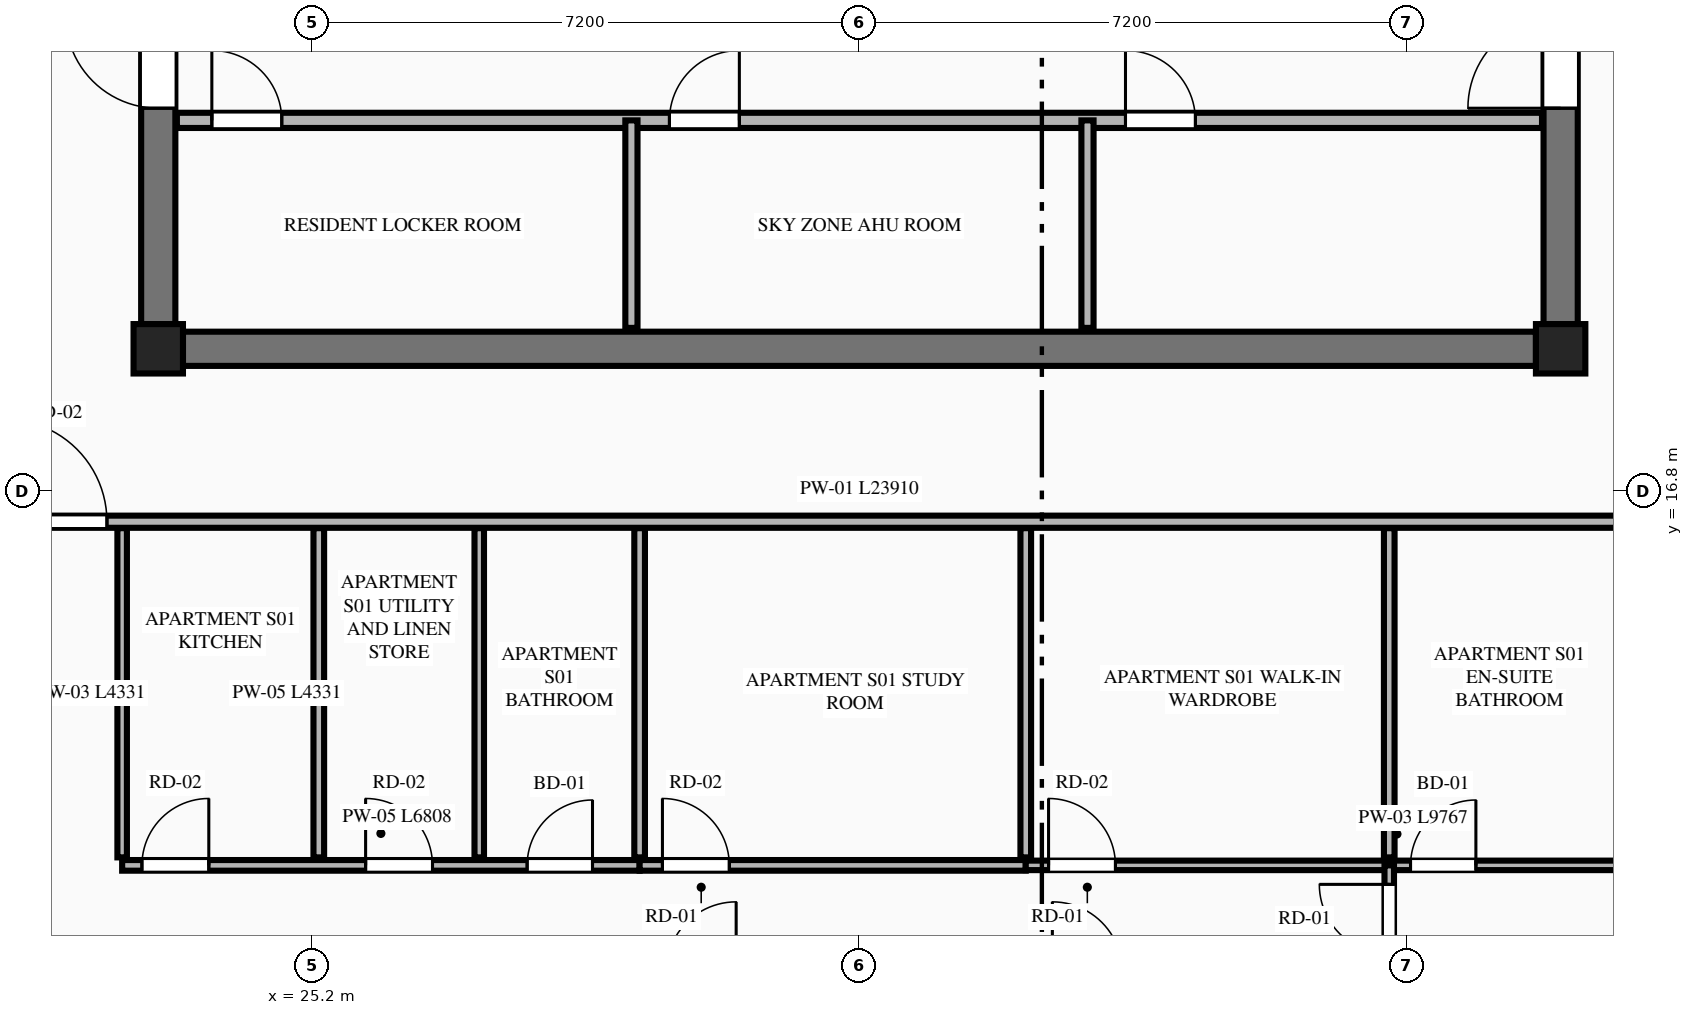
"""IFC4 building model, lengths in metres.
Left out: names, types, materials, properties, quantities, classifications, styles, units other than length and angle.
Written with IfcOpenShell. Run it as: python <this file> out.ifc"""

import sys

from ifc_helpers import new_model, si_unit, direction, frame, frame_2d, origin, origin_2d, place, context, subcontext, project, spatial, rectangle, extrude, element, fill, save


model = new_model("IFC4")
c1 = context("Model", 3, precision=1e-05, world=origin(), true_north=direction((0.0, 1.0)))
c2 = subcontext(c1, "Body", "Model", "MODEL_VIEW")
j1 = project(units=[si_unit("LENGTHUNIT", "METRE"), si_unit("PLANEANGLEUNIT", "RADIAN")], contexts=[c1])
p1 = place(None, origin())
s1 = spatial("IfcSite", under=j1, at=p1, CompositionType="ELEMENT")
p2 = place(p1, origin())
s2 = spatial("IfcBuilding", under=s1, at=p2, CompositionType="ELEMENT")
p3 = place(p2, frame((0.0, 0.0, 252.55)))
s3 = spatial("IfcBuildingStorey", under=s2, at=p3, CompositionType="ELEMENT", Elevation=252.55)
for number, where, z_axis, x_axis in (
    (1, (23.175, 18.675, 0.0), (0.0, 0.0, 1.0), (1.0, 0.0, 0.0)),
    (2, (41.625, 18.675, 0.0), (0.0, 0.0, 1.0), (1.0, 0.0, 0.0)),
):
    element("IfcColumn", number, at=place(p3, frame(where, z_axis=z_axis, x_axis=x_axis)), inside=s3, PredefinedType="COLUMN", context=c2, shape_type="SweptSolid", body=[
        extrude(rectangle(XDim=0.65, YDim=0.65, at=origin_2d()), origin(), (0.0, 0.0, 1.0), 3.65),
    ])
p4 = place(p3, frame((23.5, 18.675, 0.0), z_axis=(0.0, 0.0, 1.0), x_axis=(1.0, 0.0, 0.0)))
e3 = element("IfcWall", 3, at=p4, inside=s3, PredefinedType="SHEAR", context=c2, shape_type="SweptSolid", body=[
    extrude(rectangle(XDim=17.8, YDim=0.45, at=frame_2d((8.9, 0.0))), origin(), (0.0, 0.0, 1.0), 3.45),
])
p5 = place(p3, frame((23.175, 19.0, 0.0), z_axis=(0.0, 0.0, 1.0), x_axis=(0.0, 1.0, 0.0)))
e4 = element("IfcWall", 4, at=p5, inside=s3, PredefinedType="SHEAR", context=c2, shape_type="SweptSolid", body=[
    extrude(rectangle(XDim=13.8, YDim=0.45, at=frame_2d((6.9, 0.0))), origin(), (0.0, 0.0, 1.0), 3.45),
])
p6 = place(p5, frame((2.84, 0.0, 0.0)))
e5 = element("IfcOpeningElement", 5, at=p6, cuts=e4, PredefinedType="OPENING", context=c2, shape_type="SweptSolid", body=[
    extrude(rectangle(XDim=1.22, YDim=2.25, at=frame_2d((0.61, 1.125))), frame((0.0, 0.235, 0.0), z_axis=(0.0, -1.0, 0.0), x_axis=(1.0, 0.0, 0.0)), (0.0, 0.0, 1.0), 0.47),
])
p7 = place(p3, frame((41.625, 19.0, 0.0), z_axis=(0.0, 0.0, 1.0), x_axis=(0.0, 1.0, 0.0)))
e6 = element("IfcWall", 6, at=p7, inside=s3, PredefinedType="SHEAR", context=c2, shape_type="SweptSolid", body=[
    extrude(rectangle(XDim=13.8, YDim=0.45, at=frame_2d((6.9, 0.0))), origin(), (0.0, 0.0, 1.0), 3.45),
])
p8 = place(p7, frame((2.84, 0.0, 0.0)))
e7 = element("IfcOpeningElement", 7, at=p8, cuts=e6, PredefinedType="OPENING", context=c2, shape_type="SweptSolid", body=[
    extrude(rectangle(XDim=1.22, YDim=2.25, at=frame_2d((0.61, 1.125))), frame((0.0, 0.235, 0.0), z_axis=(0.0, -1.0, 0.0), x_axis=(1.0, 0.0, 0.0)), (0.0, 0.0, 1.0), 0.47),
])
p9 = place(p3, frame((23.42, 21.68, 0.0), z_axis=(0.0, 0.0, 1.0), x_axis=(1.0, 0.0, 0.0)))
e8 = element("IfcWall", 8, at=p9, inside=s3, PredefinedType="PLUMBINGWALL", context=c2, shape_type="SweptSolid", body=[
    extrude(rectangle(XDim=17.96, YDim=0.2, at=frame_2d((8.98, 0.0))), origin(), (0.0, 0.0, 1.0), 3.45),
])
p10 = place(p9, frame((0.46, 0.0, 0.0)))
e9 = element("IfcOpeningElement", 9, at=p10, cuts=e8, PredefinedType="OPENING", context=c2, shape_type="SweptSolid", body=[
    extrude(rectangle(XDim=0.92, YDim=2.15, at=frame_2d((0.46, 1.075))), frame((0.0, 0.11, 0.0), z_axis=(0.0, -1.0, 0.0), x_axis=(1.0, 0.0, 0.0)), (0.0, 0.0, 1.0), 0.22),
])
p11 = place(p9, frame((6.48, 0.0, 0.0)))
e10 = element("IfcOpeningElement", 10, at=p11, cuts=e8, PredefinedType="OPENING", context=c2, shape_type="SweptSolid", body=[
    extrude(rectangle(XDim=0.92, YDim=2.15, at=frame_2d((0.46, 1.075))), frame((0.0, 0.11, 0.0), z_axis=(0.0, -1.0, 0.0), x_axis=(1.0, 0.0, 0.0)), (0.0, 0.0, 1.0), 0.22),
])
p12 = place(p9, frame((12.48, 0.0, 0.0)))
e11 = element("IfcOpeningElement", 11, at=p12, cuts=e8, PredefinedType="OPENING", context=c2, shape_type="SweptSolid", body=[
    extrude(rectangle(XDim=0.92, YDim=2.15, at=frame_2d((0.46, 1.075))), frame((0.0, 0.11, 0.0), z_axis=(0.0, -1.0, 0.0), x_axis=(1.0, 0.0, 0.0)), (0.0, 0.0, 1.0), 0.22),
])
for number, where, z_axis, x_axis in (
    (12, (29.4, 18.95, 0.0), (0.0, 0.0, 1.0), (0.0, 1.0, 0.0)),
    (13, (35.4, 18.95, 0.0), (0.0, 0.0, 1.0), (0.0, 1.0, 0.0)),
):
    element("IfcWall", number, at=place(p3, frame(where, z_axis=z_axis, x_axis=x_axis)), inside=s3, PredefinedType="PARTITIONING", context=c2, shape_type="SweptSolid", body=[
        extrude(rectangle(XDim=2.73, YDim=0.16, at=frame_2d((1.365, 0.0))), origin(), (0.0, 0.0, 1.0), 3.45),
    ])
p13 = place(p3, frame((20.445, 16.4, 0.0), z_axis=(0.0, 0.0, 1.0), x_axis=(1.0, 0.0, 0.0)))
e14 = element("IfcWall", 14, at=p13, inside=s3, PredefinedType="PARTITIONING", context=c2, shape_type="SweptSolid", body=[
    extrude(rectangle(XDim=23.91, YDim=0.16, at=frame_2d((11.955, 0.0))), origin(), (0.0, 0.0, 1.0), 3.45),
])
p14 = place(p13, frame((0.705, 0.0, 0.0)))
e15 = element("IfcOpeningElement", 15, at=p14, cuts=e14, PredefinedType="OPENING", context=c2, shape_type="SweptSolid", body=[
    extrude(rectangle(XDim=1.35, YDim=2.35, at=frame_2d((0.675, 1.175))), frame((0.0, 0.09, 0.0), z_axis=(0.0, -1.0, 0.0), x_axis=(1.0, 0.0, 0.0)), (0.0, 0.0, 1.0), 0.18),
])
p15 = place(p3, frame((22.7, 11.984, 0.0), z_axis=(0.0, 0.0, 1.0), x_axis=(0.0, 1.0, 0.0)))
e16 = element("IfcWall", 16, at=p15, inside=s3, PredefinedType="PARTITIONING", context=c2, shape_type="SweptSolid", body=[
    extrude(rectangle(XDim=4.331, YDim=0.125, at=frame_2d((2.166, 0.0))), origin(), (0.0, 0.0, 1.0), 2.907),
])
p16 = place(p3, frame((22.7, 11.879, 0.0), z_axis=(0.0, 0.0, 1.0), x_axis=(1.0, 0.0, 0.0)))
e17 = element("IfcWall", 17, at=p16, inside=s3, PredefinedType="PLUMBINGWALL", context=c2, shape_type="SweptSolid", body=[
    extrude(rectangle(XDim=6.808, YDim=0.14, at=frame_2d((3.404, 0.0))), origin(), (0.0, 0.0, 1.0), 3.45),
])
p17 = place(p16, frame((5.328, 0.0, 0.0)))
e18 = element("IfcOpeningElement", 18, at=p17, cuts=e17, PredefinedType="OPENING", context=c2, shape_type="SweptSolid", body=[
    extrude(rectangle(XDim=0.86, YDim=2.1, at=frame_2d((0.43, 1.05))), frame((0.0, 0.08, 0.0), z_axis=(0.0, -1.0, 0.0), x_axis=(1.0, 0.0, 0.0)), (0.0, 0.0, 1.0), 0.16),
])
p18 = place(p16, frame((0.26, 0.0, 0.0)))
e19 = element("IfcOpeningElement", 19, at=p18, cuts=e17, PredefinedType="OPENING", context=c2, shape_type="SweptSolid", body=[
    extrude(rectangle(XDim=0.88, YDim=2.15, at=frame_2d((0.44, 1.075))), frame((0.0, 0.08, 0.0), z_axis=(0.0, -1.0, 0.0), x_axis=(1.0, 0.0, 0.0)), (0.0, 0.0, 1.0), 0.16),
])
p19 = place(p16, frame((3.203, 0.0, 0.0)))
e20 = element("IfcOpeningElement", 20, at=p19, cuts=e17, PredefinedType="OPENING", context=c2, shape_type="SweptSolid", body=[
    extrude(rectangle(XDim=0.88, YDim=2.15, at=frame_2d((0.44, 1.075))), frame((0.0, 0.08, 0.0), z_axis=(0.0, -1.0, 0.0), x_axis=(1.0, 0.0, 0.0)), (0.0, 0.0, 1.0), 0.16),
])
p20 = place(p3, frame((29.508, 11.879, 0.0), z_axis=(0.0, 0.0, 1.0), x_axis=(1.0, 0.0, 0.0)))
e21 = element("IfcWall", 21, at=p20, inside=s3, PredefinedType="PLUMBINGWALL", context=c2, shape_type="SweptSolid", body=[
    extrude(rectangle(XDim=5.08, YDim=0.14, at=frame_2d((2.54, 0.0))), origin(), (0.0, 0.0, 1.0), 3.45),
])
p21 = place(p20, frame((0.3, 0.0, 0.0)))
e22 = element("IfcOpeningElement", 22, at=p21, cuts=e21, PredefinedType="OPENING", context=c2, shape_type="SweptSolid", body=[
    extrude(rectangle(XDim=0.88, YDim=2.15, at=frame_2d((0.44, 1.075))), frame((0.0, 0.08, 0.0), z_axis=(0.0, -1.0, 0.0), x_axis=(1.0, 0.0, 0.0)), (0.0, 0.0, 1.0), 0.16),
])
p22 = place(p3, frame((34.588, 11.879, 0.0), z_axis=(0.0, 0.0, 1.0), x_axis=(1.0, 0.0, 0.0)))
e23 = element("IfcWall", 23, at=p22, inside=s3, PredefinedType="PARTITIONING", context=c2, shape_type="SweptSolid", body=[
    extrude(rectangle(XDim=9.767, YDim=0.125, at=frame_2d((4.884, 0.0))), origin(), (0.0, 0.0, 1.0), 3.45),
])
p23 = place(p22, frame((5.062, 0.0, 0.0)))
e24 = element("IfcOpeningElement", 24, at=p23, cuts=e23, PredefinedType="OPENING", context=c2, shape_type="SweptSolid", body=[
    extrude(rectangle(XDim=0.86, YDim=2.1, at=frame_2d((0.43, 1.05))), frame((0.0, 0.073, 0.0), z_axis=(0.0, -1.0, 0.0), x_axis=(1.0, 0.0, 0.0)), (0.0, 0.0, 1.0), 0.145),
])
p24 = place(p22, frame((8.226, 0.0, 0.0)))
e25 = element("IfcOpeningElement", 25, at=p24, cuts=e23, PredefinedType="OPENING", context=c2, shape_type="SweptSolid", body=[
    extrude(rectangle(XDim=0.88, YDim=2.15, at=frame_2d((0.44, 1.075))), frame((0.0, 0.073, 0.0), z_axis=(0.0, -1.0, 0.0), x_axis=(1.0, 0.0, 0.0)), (0.0, 0.0, 1.0), 0.145),
])
p25 = place(p22, frame((0.3, 0.0, 0.0)))
e26 = element("IfcOpeningElement", 26, at=p25, cuts=e23, PredefinedType="OPENING", context=c2, shape_type="SweptSolid", body=[
    extrude(rectangle(XDim=0.88, YDim=2.15, at=frame_2d((0.44, 1.075))), frame((0.0, 0.073, 0.0), z_axis=(0.0, -1.0, 0.0), x_axis=(1.0, 0.0, 0.0)), (0.0, 0.0, 1.0), 0.145),
])
p26 = place(p3, frame((25.287, 11.984, 0.0), z_axis=(0.0, 0.0, 1.0), x_axis=(0.0, 1.0, 0.0)))
e27 = element("IfcWall", 27, at=p26, inside=s3, PredefinedType="PLUMBINGWALL", context=c2, shape_type="SweptSolid", body=[
    extrude(rectangle(XDim=4.331, YDim=0.14, at=frame_2d((2.166, 0.0))), origin(), (0.0, 0.0, 1.0), 3.45),
])
p27 = place(p3, frame((27.398, 11.984, 0.0), z_axis=(0.0, 0.0, 1.0), x_axis=(0.0, 1.0, 0.0)))
e28 = element("IfcWall", 28, at=p27, inside=s3, PredefinedType="PARTITIONING", context=c2, shape_type="SweptSolid", body=[
    extrude(rectangle(XDim=4.331, YDim=0.125, at=frame_2d((2.166, 0.0))), origin(), (0.0, 0.0, 1.0), 3.45),
])
p28 = place(p3, frame((39.37, 10.549, 0.0), z_axis=(0.0, 0.0, 1.0), x_axis=(0.0, 1.0, 0.0)))
e29 = element("IfcWall", 29, at=p28, inside=s3, PredefinedType="PARTITIONING", context=c2, shape_type="SweptSolid", body=[
    extrude(rectangle(XDim=1.33, YDim=0.125, at=frame_2d((0.665, 0.0))), origin(), (0.0, 0.0, 1.0), 3.45),
])
p29 = place(p28, frame((0.16, 0.0, 0.0)))
e30 = element("IfcOpeningElement", 30, at=p29, cuts=e29, PredefinedType="OPENING", context=c2, shape_type="SweptSolid", body=[
    extrude(rectangle(XDim=0.92, YDim=2.15, at=frame_2d((0.46, 1.075))), frame((0.0, 0.073, 0.0), z_axis=(0.0, -1.0, 0.0), x_axis=(1.0, 0.0, 0.0)), (0.0, 0.0, 1.0), 0.145),
])
for number, where, z_axis, x_axis in (
    (31, (29.508, 11.984, 0.0), (0.0, 0.0, 1.0), (0.0, 1.0, 0.0)),
    (32, (34.588, 11.984, 0.0), (0.0, 0.0, 1.0), (0.0, 1.0, 0.0)),
    (33, (39.37, 11.984, 0.0), (0.0, 0.0, 1.0), (0.0, 1.0, 0.0)),
):
    element("IfcWall", number, at=place(p3, frame(where, z_axis=z_axis, x_axis=x_axis)), inside=s3, PredefinedType="PLUMBINGWALL", context=c2, shape_type="SweptSolid", body=[
        extrude(rectangle(XDim=4.331, YDim=0.14, at=frame_2d((2.166, 0.0))), origin(), (0.0, 0.0, 1.0), 3.45),
    ])
p30 = place(p6, origin())
e34 = element("IfcDoor", 34, at=p30, inside=s3, OperationType="SINGLE_SWING_RIGHT", PredefinedType="DOOR", context=c2, shape_type="SweptSolid", body=[
    extrude(rectangle(XDim=1.22, YDim=2.25, at=frame_2d((0.61, 1.125))), frame((0.0, 0.025, 0.0), z_axis=(0.0, -1.0, 0.0), x_axis=(1.0, 0.0, 0.0)), (0.0, 0.0, 1.0), 0.05),
])
fill(e5, e34)
p31 = place(p8, origin())
e35 = element("IfcDoor", 35, at=p31, inside=s3, OperationType="SINGLE_SWING_LEFT", PredefinedType="DOOR", context=c2, shape_type="SweptSolid", body=[
    extrude(rectangle(XDim=1.22, YDim=2.25, at=frame_2d((0.61, 1.125))), frame((0.0, 0.025, 0.0), z_axis=(0.0, -1.0, 0.0), x_axis=(1.0, 0.0, 0.0)), (0.0, 0.0, 1.0), 0.05),
])
fill(e7, e35)
p32 = place(p10, origin())
e36 = element("IfcDoor", 36, at=p32, inside=s3, OperationType="SINGLE_SWING_LEFT", PredefinedType="DOOR", context=c2, shape_type="SweptSolid", body=[
    extrude(rectangle(XDim=0.92, YDim=2.15, at=frame_2d((0.46, 1.075))), frame((0.0, 0.025, 0.0), z_axis=(0.0, -1.0, 0.0), x_axis=(1.0, 0.0, 0.0)), (0.0, 0.0, 1.0), 0.05),
])
fill(e9, e36)
p33 = place(p11, origin())
e37 = element("IfcDoor", 37, at=p33, inside=s3, OperationType="SINGLE_SWING_RIGHT", PredefinedType="DOOR", context=c2, shape_type="SweptSolid", body=[
    extrude(rectangle(XDim=0.92, YDim=2.15, at=frame_2d((0.46, 1.075))), frame((0.0, 0.025, 0.0), z_axis=(0.0, -1.0, 0.0), x_axis=(1.0, 0.0, 0.0)), (0.0, 0.0, 1.0), 0.05),
])
fill(e10, e37)
p34 = place(p12, origin())
e38 = element("IfcDoor", 38, at=p34, inside=s3, OperationType="SINGLE_SWING_LEFT", PredefinedType="DOOR", context=c2, shape_type="SweptSolid", body=[
    extrude(rectangle(XDim=0.92, YDim=2.15, at=frame_2d((0.46, 1.075))), frame((0.0, 0.025, 0.0), z_axis=(0.0, -1.0, 0.0), x_axis=(1.0, 0.0, 0.0)), (0.0, 0.0, 1.0), 0.05),
])
fill(e11, e38)
p35 = place(p17, origin())
e39 = element("IfcDoor", 39, at=p35, inside=s3, OperationType="SINGLE_SWING_RIGHT", PredefinedType="DOOR", context=c2, shape_type="SweptSolid", body=[
    extrude(rectangle(XDim=0.86, YDim=2.1, at=frame_2d((0.43, 1.05))), frame((0.0, 0.025, 0.0), z_axis=(0.0, -1.0, 0.0), x_axis=(1.0, 0.0, 0.0)), (0.0, 0.0, 1.0), 0.05),
])
fill(e18, e39)
p36 = place(p23, origin())
e40 = element("IfcDoor", 40, at=p36, inside=s3, OperationType="SINGLE_SWING_RIGHT", PredefinedType="DOOR", context=c2, shape_type="SweptSolid", body=[
    extrude(rectangle(XDim=0.86, YDim=2.1, at=frame_2d((0.43, 1.05))), frame((0.0, 0.025, 0.0), z_axis=(0.0, -1.0, 0.0), x_axis=(1.0, 0.0, 0.0)), (0.0, 0.0, 1.0), 0.05),
])
fill(e24, e40)
p37 = place(p14, origin())
e41 = element("IfcDoor", 41, at=p37, inside=s3, OperationType="SINGLE_SWING_LEFT", PredefinedType="DOOR", context=c2, shape_type="SweptSolid", body=[
    extrude(rectangle(XDim=1.35, YDim=2.35, at=frame_2d((0.675, 1.175))), frame((0.0, 0.025, 0.0), z_axis=(0.0, -1.0, 0.0), x_axis=(1.0, 0.0, 0.0)), (0.0, 0.0, 1.0), 0.05),
])
fill(e15, e41)
p38 = place(p18, origin())
e42 = element("IfcDoor", 42, at=p38, inside=s3, OperationType="SINGLE_SWING_RIGHT", PredefinedType="DOOR", context=c2, shape_type="SweptSolid", body=[
    extrude(rectangle(XDim=0.88, YDim=2.15, at=frame_2d((0.44, 1.075))), frame((0.0, 0.025, 0.0), z_axis=(0.0, -1.0, 0.0), x_axis=(1.0, 0.0, 0.0)), (0.0, 0.0, 1.0), 0.05),
])
fill(e19, e42)
p39 = place(p19, origin())
e43 = element("IfcDoor", 43, at=p39, inside=s3, OperationType="SINGLE_SWING_LEFT", PredefinedType="DOOR", context=c2, shape_type="SweptSolid", body=[
    extrude(rectangle(XDim=0.88, YDim=2.15, at=frame_2d((0.44, 1.075))), frame((0.0, 0.025, 0.0), z_axis=(0.0, -1.0, 0.0), x_axis=(1.0, 0.0, 0.0)), (0.0, 0.0, 1.0), 0.05),
])
fill(e20, e43)
p40 = place(p21, origin())
e44 = element("IfcDoor", 44, at=p40, inside=s3, OperationType="SINGLE_SWING_LEFT", PredefinedType="DOOR", context=c2, shape_type="SweptSolid", body=[
    extrude(rectangle(XDim=0.88, YDim=2.15, at=frame_2d((0.44, 1.075))), frame((0.0, 0.025, 0.0), z_axis=(0.0, -1.0, 0.0), x_axis=(1.0, 0.0, 0.0)), (0.0, 0.0, 1.0), 0.05),
])
fill(e22, e44)
p41 = place(p29, origin())
e45 = element("IfcDoor", 45, at=p41, inside=s3, OperationType="SINGLE_SWING_RIGHT", PredefinedType="DOOR", context=c2, shape_type="SweptSolid", body=[
    extrude(rectangle(XDim=0.92, YDim=2.15, at=frame_2d((0.46, 1.075))), frame((0.0, 0.025, 0.0), z_axis=(0.0, -1.0, 0.0), x_axis=(1.0, 0.0, 0.0)), (0.0, 0.0, 1.0), 0.05),
])
fill(e30, e45)
p42 = place(p25, origin())
e46 = element("IfcDoor", 46, at=p42, inside=s3, OperationType="SINGLE_SWING_LEFT", PredefinedType="DOOR", context=c2, shape_type="SweptSolid", body=[
    extrude(rectangle(XDim=0.88, YDim=2.15, at=frame_2d((0.44, 1.075))), frame((0.0, 0.025, 0.0), z_axis=(0.0, -1.0, 0.0), x_axis=(1.0, 0.0, 0.0)), (0.0, 0.0, 1.0), 0.05),
])
fill(e26, e46)
save(model, sys.argv[1])
